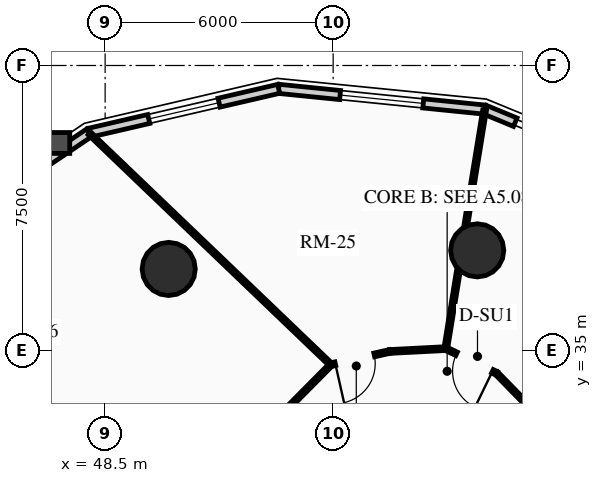
"""IFC4 building model, lengths in metres.
Left out: names, types, materials, properties, quantities, classifications, styles, units other than length and angle.
Written with IfcOpenShell. Run it as: python <this file> out.ifc"""

import sys

from ifc_helpers import new_model, si_unit, direction, frame, frame_2d, origin, origin_2d, place, context, subcontext, project, spatial, rectangle, circle, extrude, source, transform, mapped, element, fill, save


model = new_model("IFC4")
c1 = context("Model", 3, precision=1e-05, world=origin(), true_north=direction((0.0, 1.0)))
c2 = subcontext(c1, "Body", "Model", "MODEL_VIEW")
j1 = project(units=[si_unit("LENGTHUNIT", "METRE"), si_unit("PLANEANGLEUNIT", "RADIAN")], contexts=[c1])
p1 = place(None, origin())
s1 = spatial("IfcSite", under=j1, at=p1, CompositionType="ELEMENT")
p2 = place(p1, origin())
s2 = spatial("IfcBuilding", under=s1, at=p2, CompositionType="ELEMENT")
p3 = place(p2, frame((0.0, 0.0, 99.25)))
s3 = spatial("IfcBuildingStorey", under=s2, at=p3, CompositionType="ELEMENT", Elevation=99.25)
for number, where, z_axis, x_axis in (
    (1, (58.291, 37.635, 0.0), (0.0, 0.0, 1.0), (1.0, 0.0, 0.0)),
    (2, (50.173, 37.146, 0.0), (0.0, 0.0, 1.0), (1.0, 0.0, 0.0)),
):
    element("IfcColumn", number, at=place(p3, frame(where, z_axis=z_axis, x_axis=x_axis)), inside=s3, PredefinedType="USERDEFINED", context=c2, shape_type="SweptSolid", body=[
        extrude(circle(Radius=0.7, at=origin_2d()), origin(), (0.0, 0.0, 1.0), 2.91),
    ])
p4 = place(p3, frame((58.487, 41.339, 0.0), z_axis=(0.0, 0.0, 1.0), x_axis=(0.924556017656, -0.381046152345, 0.0)))
e3 = element("IfcWall", 3, at=p4, inside=s3, PredefinedType="SOLIDWALL", context=c2, shape_type="SweptSolid", body=[
    extrude(rectangle(XDim=0.87, YDim=0.24, at=frame_2d((0.435, 0.0))), origin(), (0.0, 0.0, 1.0), 2.179),
])
p5 = place(p3, frame((53.067, 41.885, 0.0), z_axis=(0.0, 0.0, 1.0), x_axis=(0.994971754311, -0.10015591906, 0.0)))
e4 = element("IfcWall", 4, at=p5, inside=s3, PredefinedType="SOLIDWALL", context=c2, shape_type="SweptSolid", body=[
    extrude(rectangle(XDim=5.448, YDim=0.24, at=frame_2d((2.724, 0.0))), origin(), (0.0, 0.0, 1.0), 2.179),
])
m1 = source(origin(), c2, "Body", "SweptSolid", [
    extrude(rectangle(XDim=2.2, YDim=1.35, at=frame_2d((1.1, 0.675))), frame((0.0, 0.13, 0.0), z_axis=(0.0, -1.0, 0.0), x_axis=(1.0, 0.0, 0.0)), (0.0, 0.0, 1.0), 0.26),
])
p6 = place(p5, frame((1.624, 0.0, 0.65)))
e5 = element("IfcOpeningElement", 5, at=p6, cuts=e4, PredefinedType="OPENING", context=c2, shape_type="MappedRepresentation", body=[
    mapped(m1, transform((0.0, 0.0, 0.0), x_axis=(1.0, 0.0, 0.0), y_axis=(0.0, 1.0, 0.0), z_axis=(0.0, 0.0, 1.0), scale=1.0)),
])
p7 = place(p3, frame((48.08, 40.729, 0.0), z_axis=(0.0, 0.0, 1.0), x_axis=(0.974165631126, 0.225834725257, 0.0)))
e6 = element("IfcWall", 6, at=p7, inside=s3, PredefinedType="SOLIDWALL", context=c2, shape_type="SweptSolid", body=[
    extrude(rectangle(XDim=5.119, YDim=0.24, at=frame_2d((2.56, 0.0))), origin(), (0.0, 0.0, 1.0), 2.179),
])
m2 = source(origin(), c2, "Body", "SweptSolid", [
    extrude(rectangle(XDim=1.9, YDim=1.35, at=frame_2d((0.95, 0.675))), frame((0.0, 0.13, 0.0), z_axis=(0.0, -1.0, 0.0), x_axis=(1.0, 0.0, 0.0)), (0.0, 0.0, 1.0), 0.26),
])
p8 = place(p7, frame((1.609, 0.0, 0.65)))
e7 = element("IfcOpeningElement", 7, at=p8, cuts=e6, PredefinedType="OPENING", context=c2, shape_type="MappedRepresentation", body=[
    mapped(m2, transform((0.0, 0.0, 0.0), x_axis=(1.0, 0.0, 0.0), y_axis=(0.0, 1.0, 0.0), z_axis=(0.0, 0.0, 1.0), scale=1.0)),
])
p9 = place(p3, frame((44.015, 37.985, 0.0), z_axis=(0.0, 0.0, 1.0), x_axis=(0.828781148131, 0.559572880421, 0.0)))
e8 = element("IfcWall", 8, at=p9, inside=s3, PredefinedType="SOLIDWALL", context=c2, shape_type="SweptSolid", body=[
    extrude(rectangle(XDim=4.905, YDim=0.24, at=frame_2d((2.452, 0.0))), origin(), (0.0, 0.0, 1.0), 2.179),
])
p10 = place(p3, frame((63.051, 30.051, 0.0), z_axis=(0.0, 0.0, 1.0), x_axis=(-0.698911483116, 0.715208178622, 0.0)))
e9 = element("IfcWall", 9, at=p10, inside=s3, PredefinedType="MOVABLE", context=c2, shape_type="SweptSolid", body=[
    extrude(rectangle(XDim=6.082, YDim=0.1, at=frame_2d((3.041, 0.0))), origin(), (0.0, 0.0, 1.0), 2.225),
])
p11 = place(p3, frame((58.8, 34.401, 0.0), z_axis=(0.0, 0.0, 1.0), x_axis=(-0.899620612635, 0.436672363818, 0.0)))
e10 = element("IfcWall", 10, at=p11, inside=s3, PredefinedType="MOVABLE", context=c2, shape_type="SweptSolid", body=[
    extrude(rectangle(XDim=1.487, YDim=0.1, at=frame_2d((0.743, 0.0))), origin(), (0.0, 0.0, 1.0), 2.225),
])
m3 = source(origin(), c2, "Body", "SweptSolid", [
    extrude(rectangle(XDim=1.05, YDim=2.015, at=frame_2d((0.525, 1.007))), frame((0.0, 0.06, 0.0), z_axis=(0.0, -1.0, 0.0), x_axis=(1.0, 0.0, 0.0)), (0.0, 0.0, 1.0), 0.12),
])
p12 = place(p11, frame((0.12, 0.0, 0.0)))
e11 = element("IfcOpeningElement", 11, at=p12, cuts=e10, PredefinedType="OPENING", context=c2, shape_type="MappedRepresentation", body=[
    mapped(m3, transform((0.0, 0.0, 0.0), x_axis=(1.0, 0.0, 0.0), y_axis=(0.0, 1.0, 0.0), z_axis=(0.0, 0.0, 1.0), scale=1.0)),
])
p13 = place(p3, frame((57.462, 35.05, 0.0), z_axis=(0.0, 0.0, 1.0), x_axis=(-0.998677016607, -0.051421945723, 0.0)))
e12 = element("IfcWall", 12, at=p13, inside=s3, PredefinedType="MOVABLE", context=c2, shape_type="SweptSolid", body=[
    extrude(rectangle(XDim=1.477, YDim=0.1, at=frame_2d((0.738, 0.0))), origin(), (0.0, 0.0, 1.0), 2.225),
])
p14 = place(p3, frame((55.988, 34.974, 0.0), z_axis=(0.0, 0.0, 1.0), x_axis=(-0.975666565154, -0.219259557695, 0.0)))
e13 = element("IfcWall", 13, at=p14, inside=s3, PredefinedType="MOVABLE", context=c2, shape_type="SweptSolid", body=[
    extrude(rectangle(XDim=1.587, YDim=0.1, at=frame_2d((0.793, 0.0))), origin(), (0.0, 0.0, 1.0), 2.225),
])
p15 = place(p14, frame((0.417, 0.0, 0.0)))
e14 = element("IfcOpeningElement", 14, at=p15, cuts=e13, PredefinedType="OPENING", context=c2, shape_type="MappedRepresentation", body=[
    mapped(m3, transform((0.0, 0.0, 0.0), x_axis=(1.0, 0.0, 0.0), y_axis=(0.0, 1.0, 0.0), z_axis=(0.0, 0.0, 1.0), scale=1.0)),
])
p16 = place(p3, frame((54.44, 34.626, 0.0), z_axis=(0.0, 0.0, 1.0), x_axis=(-0.703978840546, -0.710220945948, 0.0)))
e15 = element("IfcWall", 15, at=p16, inside=s3, PredefinedType="MOVABLE", context=c2, shape_type="SweptSolid", body=[
    extrude(rectangle(XDim=3.364, YDim=0.1, at=frame_2d((1.682, 0.0))), origin(), (0.0, 0.0, 1.0), 2.225),
])
p17 = place(p16, frame((1.546, 0.0, 0.0)))
e16 = element("IfcOpeningElement", 16, at=p17, cuts=e15, PredefinedType="OPENING", context=c2, shape_type="MappedRepresentation", body=[
    mapped(m3, transform((0.0, 0.0, 0.0), x_axis=(1.0, 0.0, 0.0), y_axis=(0.0, 1.0, 0.0), z_axis=(0.0, 0.0, 1.0), scale=1.0)),
])
p18 = place(p3, frame((57.462, 35.05, 0.0), z_axis=(0.0, 0.0, 1.0), x_axis=(0.160845392798, 0.98697961459, 0.0)))
e17 = element("IfcWall", 17, at=p18, inside=s3, PredefinedType="MOVABLE", context=c2, shape_type="SweptSolid", body=[
    extrude(rectangle(XDim=6.352, YDim=0.1, at=frame_2d((3.176, 0.0))), origin(), (0.0, 0.0, 1.0), 2.179),
])
p19 = place(p3, frame((54.44, 34.626, 0.0), z_axis=(0.0, 0.0, 1.0), x_axis=(-0.722045979822, 0.691845071547, 0.0)))
e18 = element("IfcWall", 18, at=p19, inside=s3, PredefinedType="MOVABLE", context=c2, shape_type="SweptSolid", body=[
    extrude(rectangle(XDim=8.795, YDim=0.1, at=frame_2d((4.397, 0.0))), origin(), (0.0, 0.0, 1.0), 2.179),
])
m4 = source(origin(), c2, "Body", "SweptSolid", [
    extrude(rectangle(XDim=2.2, YDim=1.35, at=frame_2d((1.1, 0.675))), frame((0.0, 0.03, 0.0), z_axis=(0.0, -1.0, 0.0), x_axis=(1.0, 0.0, 0.0)), (0.0, 0.0, 1.0), 0.06),
])
p20 = place(p6, origin())
e19 = element("IfcWindow", 19, at=p20, inside=s3, PartitioningType="DOUBLE_PANEL_VERTICAL", PredefinedType="WINDOW", context=c2, shape_type="MappedRepresentation", body=[
    mapped(m4, transform((0.0, 0.0, 0.0), x_axis=(1.0, 0.0, 0.0), y_axis=(0.0, 1.0, 0.0), z_axis=(0.0, 0.0, 1.0), scale=1.0)),
])
fill(e5, e19)
m5 = source(origin(), c2, "Body", "SweptSolid", [
    extrude(rectangle(XDim=1.9, YDim=1.35, at=frame_2d((0.95, 0.675))), frame((0.0, 0.03, 0.0), z_axis=(0.0, -1.0, 0.0), x_axis=(1.0, 0.0, 0.0)), (0.0, 0.0, 1.0), 0.06),
])
p21 = place(p8, origin())
e20 = element("IfcWindow", 20, at=p21, inside=s3, PartitioningType="DOUBLE_PANEL_VERTICAL", PredefinedType="WINDOW", context=c2, shape_type="MappedRepresentation", body=[
    mapped(m5, transform((0.0, 0.0, 0.0), x_axis=(1.0, 0.0, 0.0), y_axis=(0.0, 1.0, 0.0), z_axis=(0.0, 0.0, 1.0), scale=1.0)),
])
fill(e7, e20)
m6 = source(origin(), c2, "Body", "SweptSolid", [
    extrude(rectangle(XDim=1.05, YDim=2.015, at=frame_2d((0.525, 1.007))), frame((0.0, 0.025, 0.0), z_axis=(0.0, -1.0, 0.0), x_axis=(1.0, 0.0, 0.0)), (0.0, 0.0, 1.0), 0.05),
])
p22 = place(p15, origin())
e21 = element("IfcDoor", 21, at=p22, inside=s3, OperationType="SINGLE_SWING_RIGHT", PredefinedType="DOOR", context=c2, shape_type="MappedRepresentation", body=[
    mapped(m6, transform((0.0, 0.0, 0.0), x_axis=(1.0, 0.0, 0.0), y_axis=(0.0, 1.0, 0.0), z_axis=(0.0, 0.0, 1.0), scale=1.0)),
])
fill(e14, e21)
p23 = place(p12, origin())
e22 = element("IfcDoor", 22, at=p23, inside=s3, OperationType="SINGLE_SWING_LEFT", PredefinedType="DOOR", context=c2, shape_type="MappedRepresentation", body=[
    mapped(m6, transform((0.0, 0.0, 0.0), x_axis=(1.0, 0.0, 0.0), y_axis=(0.0, 1.0, 0.0), z_axis=(0.0, 0.0, 1.0), scale=1.0)),
])
fill(e11, e22)
save(model, sys.argv[1])
